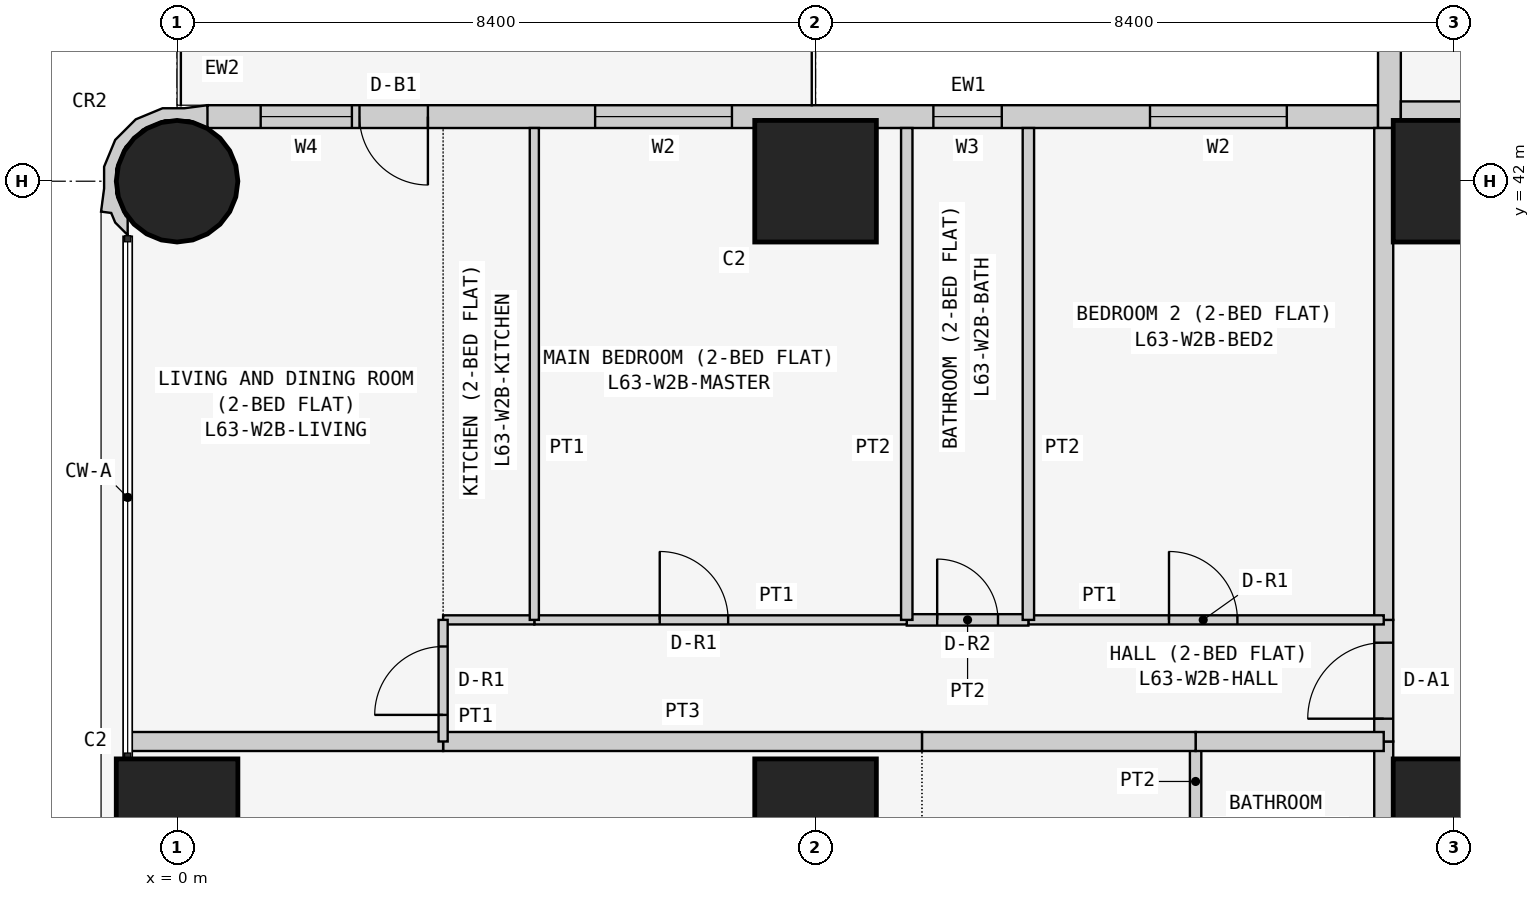
"""IFC4 building model, lengths in metres.
Left out: names, types, materials, properties, quantities, classifications, styles, units other than length and angle.
Written with IfcOpenShell. Run it as: python <this file> out.ifc"""

import sys

from ifc_helpers import new_model, si_unit, direction, frame, frame_2d, origin, origin_2d, place, context, subcontext, project, spatial, polyline, rectangle, circle, outline, extrude, element, fill, save


model = new_model("IFC4")
c1 = context("Model", 3, precision=1e-05, world=origin(), true_north=direction((0.0, 1.0)))
c2 = subcontext(c1, "Body", "Model", "MODEL_VIEW")
j1 = project(units=[si_unit("LENGTHUNIT", "METRE"), si_unit("PLANEANGLEUNIT", "RADIAN")], contexts=[c1])
p1 = place(None, origin())
s1 = spatial("IfcSite", under=j1, at=p1, CompositionType="ELEMENT")
p2 = place(p1, origin())
s2 = spatial("IfcBuilding", under=s1, at=p2, CompositionType="ELEMENT")
p3 = place(p2, frame((0.0, 0.0, 240.9)))
s3 = spatial("IfcBuildingStorey", under=s2, at=p3, CompositionType="ELEMENT", Elevation=240.9)
p4 = place(p3, frame((0.0, 33.6, 0.0), z_axis=(0.0, 0.0, 1.0), x_axis=(1.0, 0.0, 0.0)))
e1 = element("IfcColumn", 1, at=p4, inside=s3, PredefinedType="COLUMN", context=c2, shape_type="SweptSolid", body=[
    extrude(rectangle(XDim=1.6, YDim=1.6, at=origin_2d()), origin(), (0.0, 0.0, 1.0), 3.6),
])
p5 = place(p3, frame((0.0, 42.0, 0.0), z_axis=(0.0, 0.0, 1.0), x_axis=(1.0, 0.0, 0.0)))
e2 = element("IfcColumn", 2, at=p5, inside=s3, PredefinedType="COLUMN", context=c2, shape_type="SweptSolid", body=[
    extrude(circle(Radius=0.8, at=origin_2d()), origin(), (0.0, 0.0, 1.0), 3.6),
])
for number, where, z_axis, x_axis in (
    (3, (8.4, 33.6, 0.0), (0.0, 0.0, 1.0), (1.0, 0.0, 0.0)),
    (4, (8.4, 42.0, 0.0), (0.0, 0.0, 1.0), (1.0, 0.0, 0.0)),
    (5, (16.8, 33.6, 0.0), (0.0, 0.0, 1.0), (1.0, 0.0, 0.0)),
    (6, (16.8, 42.0, 0.0), (0.0, 0.0, 1.0), (1.0, 0.0, 0.0)),
):
    element("IfcColumn", number, at=place(p3, frame(where, z_axis=z_axis, x_axis=x_axis)), inside=s3, PredefinedType="COLUMN", context=c2, shape_type="SweptSolid", body=[
        extrude(rectangle(XDim=1.6, YDim=1.6, at=origin_2d()), origin(), (0.0, 0.0, 1.0), 3.6),
    ])
p6 = place(p3, frame((15.8, 42.85, 0.0), z_axis=(0.0, 0.0, 1.0), x_axis=(-1.0, 0.0, 0.0)))
e7 = element("IfcWall", 7, at=p6, inside=s3, PredefinedType="SOLIDWALL", context=c2, shape_type="SweptSolid", body=[
    extrude(rectangle(XDim=15.4, YDim=0.3, at=frame_2d((7.7, 0.0))), origin(), (0.0, 0.0, 1.0), 3.45),
])
p7 = place(p6, frame((1.2, 0.0, 0.9)))
e8 = element("IfcOpeningElement", 8, at=p7, cuts=e7, PredefinedType="OPENING", context=c2, shape_type="SweptSolid", body=[
    extrude(rectangle(XDim=1.8, YDim=1.5, at=frame_2d((0.9, 0.75))), frame((0.0, 0.16, 0.0), z_axis=(0.0, -1.0, 0.0), x_axis=(1.0, 0.0, 0.0)), (0.0, 0.0, 1.0), 0.32),
])
p8 = place(p6, frame((4.95, 0.0, 1.5)))
e9 = element("IfcOpeningElement", 9, at=p8, cuts=e7, PredefinedType="OPENING", context=c2, shape_type="SweptSolid", body=[
    extrude(rectangle(XDim=0.9, YDim=0.7, at=frame_2d((0.45, 0.35))), frame((0.0, 0.16, 0.0), z_axis=(0.0, -1.0, 0.0), x_axis=(1.0, 0.0, 0.0)), (0.0, 0.0, 1.0), 0.32),
])
p9 = place(p6, frame((8.5, 0.0, 0.9)))
e10 = element("IfcOpeningElement", 10, at=p9, cuts=e7, PredefinedType="OPENING", context=c2, shape_type="SweptSolid", body=[
    extrude(rectangle(XDim=1.8, YDim=1.5, at=frame_2d((0.9, 0.75))), frame((0.0, 0.16, 0.0), z_axis=(0.0, -1.0, 0.0), x_axis=(1.0, 0.0, 0.0)), (0.0, 0.0, 1.0), 0.32),
])
p10 = place(p6, frame((12.5, 0.0, 0.0)))
e11 = element("IfcOpeningElement", 11, at=p10, cuts=e7, PredefinedType="OPENING", context=c2, shape_type="SweptSolid", body=[
    extrude(rectangle(XDim=0.9, YDim=2.4, at=frame_2d((0.45, 1.2))), frame((0.0, 0.16, 0.0), z_axis=(0.0, -1.0, 0.0), x_axis=(1.0, 0.0, 0.0)), (0.0, 0.0, 1.0), 0.32),
])
p11 = place(p6, frame((13.5, 0.0, 0.9)))
e12 = element("IfcOpeningElement", 12, at=p11, cuts=e7, PredefinedType="OPENING", context=c2, shape_type="SweptSolid", body=[
    extrude(rectangle(XDim=1.2, YDim=1.5, at=frame_2d((0.6, 0.75))), frame((0.0, 0.16, 0.0), z_axis=(0.0, -1.0, 0.0), x_axis=(1.0, 0.0, 0.0)), (0.0, 0.0, 1.0), 0.32),
])
p12 = place(p3, frame((15.95, 50.0, 0.0), z_axis=(0.0, 0.0, 1.0), x_axis=(0.0, -1.0, 0.0)))
e13 = element("IfcWall", 13, at=p12, inside=s3, PredefinedType="SOLIDWALL", context=c2, shape_type="SweptSolid", body=[
    extrude(rectangle(XDim=7.3, YDim=0.3, at=frame_2d((3.65, 0.0))), origin(), (0.0, 0.0, 1.0), 3.45),
])
p13 = place(p12, frame((3.1, 0.0, 0.9)))
e14 = element("IfcOpeningElement", 14, at=p13, cuts=e13, PredefinedType="OPENING", context=c2, shape_type="SweptSolid", body=[
    extrude(rectangle(XDim=2.4, YDim=1.5, at=frame_2d((1.2, 0.75))), frame((0.0, 0.16, 0.0), z_axis=(0.0, -1.0, 0.0), x_axis=(1.0, 0.0, 0.0)), (0.0, 0.0, 1.0), 0.32),
])
p14 = place(p12, frame((0.75, 0.0, 0.9)))
e15 = element("IfcOpeningElement", 15, at=p14, cuts=e13, PredefinedType="OPENING", context=c2, shape_type="SweptSolid", body=[
    extrude(rectangle(XDim=1.2, YDim=1.5, at=frame_2d((0.6, 0.75))), frame((0.0, 0.16, 0.0), z_axis=(0.0, -1.0, 0.0), x_axis=(1.0, 0.0, 0.0)), (0.0, 0.0, 1.0), 0.32),
])
p15 = place(p3, frame((0.327, 42.817, 0.0), z_axis=(0.0, 0.0, 1.0), x_axis=(-0.93923434088, 0.343276641956, 0.0)))
e16 = element("IfcWall", 16, at=p15, inside=s3, PredefinedType="SOLIDWALL", context=c2, shape_type="SweptSolid", body=[
    extrude(outline(polyline([(-0.006, -0.197), (0.266, -0.055), (0.535, 0.044), (0.816, 0.302), (0.977, 0.648), (0.994, 1.03), (0.895, 1.299), (0.828, 1.598), (0.697, 1.569), (0.604, 1.67), (0.394, 1.767), (0.471, 1.556), (0.509, 1.539), (0.724, 1.304), (0.833, 1.005), (0.82, 0.687), (0.686, 0.397), (0.451, 0.182), (0.152, 0.073), (-0.116, 0.084), (-0.127, 0.078), (-0.146, 0.071), (-0.006, -0.197)])), origin(), (0.0, 0.0, 1.0), 3.45),
])
p16 = place(p3, frame((16.1, 42.925, 0.0), z_axis=(0.0, 0.0, 1.0), x_axis=(1.0, 0.0, 0.0)))
e17 = element("IfcWall", 17, at=p16, inside=s3, PredefinedType="PARTITIONING", context=c2, shape_type="SweptSolid", body=[
    extrude(rectangle(XDim=6.871, YDim=0.25, at=frame_2d((3.436, 0.0))), origin(), (0.0, 0.0, 1.0), 3.45),
])
p17 = place(p3, frame((15.875, 32.0, 0.0), z_axis=(0.0, 0.0, 1.0), x_axis=(0.0, 1.0, 0.0)))
e18 = element("IfcWall", 18, at=p17, inside=s3, PredefinedType="PARTITIONING", context=c2, shape_type="SweptSolid", body=[
    extrude(rectangle(XDim=2.629, YDim=0.25, at=frame_2d((1.314, 0.0))), origin(), (0.0, 0.0, 1.0), 3.45),
])
p18 = place(p3, frame((15.875, 34.629, 0.0), z_axis=(0.0, 0.0, 1.0), x_axis=(0.0, 1.0, 0.0)))
e19 = element("IfcWall", 19, at=p18, inside=s3, PredefinedType="PARTITIONING", context=c2, shape_type="SweptSolid", body=[
    extrude(rectangle(XDim=1.6, YDim=0.25, at=frame_2d((0.8, 0.0))), origin(), (0.0, 0.0, 1.0), 3.45),
])
p19 = place(p18, frame((0.3, 0.0, 0.0)))
e20 = element("IfcOpeningElement", 20, at=p19, cuts=e19, PredefinedType="OPENING", context=c2, shape_type="SweptSolid", body=[
    extrude(rectangle(XDim=1.0, YDim=2.1, at=frame_2d((0.5, 1.05))), frame((0.0, 0.135, 0.0), z_axis=(0.0, -1.0, 0.0), x_axis=(1.0, 0.0, 0.0)), (0.0, 0.0, 1.0), 0.27),
])
p20 = place(p3, frame((15.875, 36.229, 0.0), z_axis=(0.0, 0.0, 1.0), x_axis=(0.0, 1.0, 0.0)))
e21 = element("IfcWall", 21, at=p20, inside=s3, PredefinedType="PARTITIONING", context=c2, shape_type="SweptSolid", body=[
    extrude(rectangle(XDim=6.471, YDim=0.25, at=frame_2d((3.235, 0.0))), origin(), (0.0, 0.0, 1.0), 3.45),
])
p21 = place(p3, frame((13.4, 32.0, 0.0), z_axis=(0.0, 0.0, 1.0), x_axis=(0.0, 1.0, 0.0)))
e22 = element("IfcWall", 22, at=p21, inside=s3, PredefinedType="PARTITIONING", context=c2, shape_type="SweptSolid", body=[
    extrude(rectangle(XDim=2.629, YDim=0.15, at=frame_2d((1.314, 0.0))), origin(), (0.0, 0.0, 1.0), 3.45),
])
p22 = place(p3, frame((13.4, 34.629, 0.0), z_axis=(0.0, 0.0, 1.0), x_axis=(1.0, 0.0, 0.0)))
e23 = element("IfcWall", 23, at=p22, inside=s3, PredefinedType="PARTITIONING", context=c2, shape_type="SweptSolid", body=[
    extrude(rectangle(XDim=2.475, YDim=0.25, at=frame_2d((1.238, 0.0))), origin(), (0.0, 0.0, 1.0), 3.45),
])
p23 = place(p3, frame((9.8, 34.629, 0.0), z_axis=(0.0, 0.0, 1.0), x_axis=(1.0, 0.0, 0.0)))
e24 = element("IfcWall", 24, at=p23, inside=s3, PredefinedType="PARTITIONING", context=c2, shape_type="SweptSolid", body=[
    extrude(rectangle(XDim=3.6, YDim=0.25, at=frame_2d((1.8, 0.0))), origin(), (0.0, 0.0, 1.0), 3.45),
])
p24 = place(p3, frame((3.5, 34.629, 0.0), z_axis=(0.0, 0.0, 1.0), x_axis=(1.0, 0.0, 0.0)))
e25 = element("IfcWall", 25, at=p24, inside=s3, PredefinedType="PARTITIONING", context=c2, shape_type="SweptSolid", body=[
    extrude(rectangle(XDim=6.3, YDim=0.25, at=frame_2d((3.15, 0.0))), origin(), (0.0, 0.0, 1.0), 3.45),
])
p25 = place(p3, frame((-0.65, 34.629, 0.0), z_axis=(0.0, 0.0, 1.0), x_axis=(1.0, 0.0, 0.0)))
e26 = element("IfcWall", 26, at=p25, inside=s3, PredefinedType="PARTITIONING", context=c2, shape_type="SweptSolid", body=[
    extrude(rectangle(XDim=4.15, YDim=0.25, at=frame_2d((2.075, 0.0))), origin(), (0.0, 0.0, 1.0), 3.45),
])
p26 = place(p3, frame((11.2, 36.229, 0.0), z_axis=(0.0, 0.0, 1.0), x_axis=(1.0, 0.0, 0.0)))
e27 = element("IfcWall", 27, at=p26, inside=s3, PredefinedType="PARTITIONING", context=c2, shape_type="SweptSolid", body=[
    extrude(rectangle(XDim=4.675, YDim=0.12, at=frame_2d((2.337, 0.0))), origin(), (0.0, 0.0, 1.0), 3.45),
])
p27 = place(p26, frame((1.85, 0.0, 0.0)))
e28 = element("IfcOpeningElement", 28, at=p27, cuts=e27, PredefinedType="OPENING", context=c2, shape_type="SweptSolid", body=[
    extrude(rectangle(XDim=0.9, YDim=2.1, at=frame_2d((0.45, 1.05))), frame((0.0, 0.07, 0.0), z_axis=(0.0, -1.0, 0.0), x_axis=(1.0, 0.0, 0.0)), (0.0, 0.0, 1.0), 0.14),
])
p28 = place(p3, frame((9.6, 36.229, 0.0), z_axis=(0.0, 0.0, 1.0), x_axis=(1.0, 0.0, 0.0)))
e29 = element("IfcWall", 29, at=p28, inside=s3, PredefinedType="PARTITIONING", context=c2, shape_type="SweptSolid", body=[
    extrude(rectangle(XDim=1.6, YDim=0.15, at=frame_2d((0.8, 0.0))), origin(), (0.0, 0.0, 1.0), 3.45),
])
p29 = place(p28, frame((0.4, 0.0, 0.0)))
e30 = element("IfcOpeningElement", 30, at=p29, cuts=e29, PredefinedType="OPENING", context=c2, shape_type="SweptSolid", body=[
    extrude(rectangle(XDim=0.8, YDim=2.1, at=frame_2d((0.4, 1.05))), frame((0.0, 0.085, 0.0), z_axis=(0.0, -1.0, 0.0), x_axis=(1.0, 0.0, 0.0)), (0.0, 0.0, 1.0), 0.17),
])
p30 = place(p3, frame((4.7, 36.229, 0.0), z_axis=(0.0, 0.0, 1.0), x_axis=(1.0, 0.0, 0.0)))
e31 = element("IfcWall", 31, at=p30, inside=s3, PredefinedType="PARTITIONING", context=c2, shape_type="SweptSolid", body=[
    extrude(rectangle(XDim=4.9, YDim=0.12, at=frame_2d((2.45, 0.0))), origin(), (0.0, 0.0, 1.0), 3.45),
])
p31 = place(p30, frame((1.65, 0.0, 0.0)))
e32 = element("IfcOpeningElement", 32, at=p31, cuts=e31, PredefinedType="OPENING", context=c2, shape_type="SweptSolid", body=[
    extrude(rectangle(XDim=0.9, YDim=2.1, at=frame_2d((0.45, 1.05))), frame((0.0, 0.07, 0.0), z_axis=(0.0, -1.0, 0.0), x_axis=(1.0, 0.0, 0.0)), (0.0, 0.0, 1.0), 0.14),
])
p32 = place(p3, frame((3.5, 36.229, 0.0), z_axis=(0.0, 0.0, 1.0), x_axis=(1.0, 0.0, 0.0)))
e33 = element("IfcWall", 33, at=p32, inside=s3, PredefinedType="PARTITIONING", context=c2, shape_type="SweptSolid", body=[
    extrude(rectangle(XDim=1.2, YDim=0.12, at=frame_2d((0.6, 0.0))), origin(), (0.0, 0.0, 1.0), 3.45),
])
p33 = place(p3, frame((3.5, 34.629, 0.0), z_axis=(0.0, 0.0, 1.0), x_axis=(0.0, 1.0, 0.0)))
e34 = element("IfcWall", 34, at=p33, inside=s3, PredefinedType="PARTITIONING", context=c2, shape_type="SweptSolid", body=[
    extrude(rectangle(XDim=1.6, YDim=0.12, at=frame_2d((0.8, 0.0))), origin(), (0.0, 0.0, 1.0), 3.45),
])
p34 = place(p33, frame((0.35, 0.0, 0.0)))
e35 = element("IfcOpeningElement", 35, at=p34, cuts=e34, PredefinedType="OPENING", context=c2, shape_type="SweptSolid", body=[
    extrude(rectangle(XDim=0.9, YDim=2.1, at=frame_2d((0.45, 1.05))), frame((0.0, 0.07, 0.0), z_axis=(0.0, -1.0, 0.0), x_axis=(1.0, 0.0, 0.0)), (0.0, 0.0, 1.0), 0.14),
])
for number, where, z_axis, x_axis in (
    (36, (11.2, 36.229, 0.0), (0.0, 0.0, 1.0), (0.0, 1.0, 0.0)),
    (37, (9.6, 36.229, 0.0), (0.0, 0.0, 1.0), (0.0, 1.0, 0.0)),
):
    element("IfcWall", number, at=place(p3, frame(where, z_axis=z_axis, x_axis=x_axis)), inside=s3, PredefinedType="PARTITIONING", context=c2, shape_type="SweptSolid", body=[
        extrude(rectangle(XDim=6.471, YDim=0.15, at=frame_2d((3.235, 0.0))), origin(), (0.0, 0.0, 1.0), 3.45),
    ])
p35 = place(p3, frame((4.7, 36.229, 0.0), z_axis=(0.0, 0.0, 1.0), x_axis=(0.0, 1.0, 0.0)))
e38 = element("IfcWall", 38, at=p35, inside=s3, PredefinedType="PARTITIONING", context=c2, shape_type="SweptSolid", body=[
    extrude(rectangle(XDim=6.471, YDim=0.12, at=frame_2d((3.235, 0.0))), origin(), (0.0, 0.0, 1.0), 3.45),
])
p36 = place(p7, origin())
e39 = element("IfcWindow", 39, at=p36, inside=s3, PartitioningType="SINGLE_PANEL", PredefinedType="WINDOW", context=c2, shape_type="SweptSolid", body=[
    extrude(rectangle(XDim=1.8, YDim=1.5, at=frame_2d((0.9, 0.75))), frame((0.0, 0.03, 0.0), z_axis=(0.0, -1.0, 0.0), x_axis=(1.0, 0.0, 0.0)), (0.0, 0.0, 1.0), 0.06),
])
fill(e8, e39)
p37 = place(p8, origin())
e40 = element("IfcWindow", 40, at=p37, inside=s3, PartitioningType="SINGLE_PANEL", PredefinedType="WINDOW", context=c2, shape_type="SweptSolid", body=[
    extrude(rectangle(XDim=0.9, YDim=0.7, at=frame_2d((0.45, 0.35))), frame((0.0, 0.03, 0.0), z_axis=(0.0, -1.0, 0.0), x_axis=(1.0, 0.0, 0.0)), (0.0, 0.0, 1.0), 0.06),
])
fill(e9, e40)
p38 = place(p9, origin())
e41 = element("IfcWindow", 41, at=p38, inside=s3, PartitioningType="SINGLE_PANEL", PredefinedType="WINDOW", context=c2, shape_type="SweptSolid", body=[
    extrude(rectangle(XDim=1.8, YDim=1.5, at=frame_2d((0.9, 0.75))), frame((0.0, 0.03, 0.0), z_axis=(0.0, -1.0, 0.0), x_axis=(1.0, 0.0, 0.0)), (0.0, 0.0, 1.0), 0.06),
])
fill(e10, e41)
p39 = place(p10, origin())
e42 = element("IfcDoor", 42, at=p39, inside=s3, OperationType="SINGLE_SWING_LEFT", PredefinedType="DOOR", context=c2, shape_type="SweptSolid", body=[
    extrude(rectangle(XDim=0.9, YDim=2.4, at=frame_2d((0.45, 1.2))), frame((0.0, 0.025, 0.0), z_axis=(0.0, -1.0, 0.0), x_axis=(1.0, 0.0, 0.0)), (0.0, 0.0, 1.0), 0.05),
])
fill(e11, e42)
p40 = place(p11, origin())
e43 = element("IfcWindow", 43, at=p40, inside=s3, PartitioningType="SINGLE_PANEL", PredefinedType="WINDOW", context=c2, shape_type="SweptSolid", body=[
    extrude(rectangle(XDim=1.2, YDim=1.5, at=frame_2d((0.6, 0.75))), frame((0.0, 0.03, 0.0), z_axis=(0.0, -1.0, 0.0), x_axis=(1.0, 0.0, 0.0)), (0.0, 0.0, 1.0), 0.06),
])
fill(e12, e43)
p41 = place(p19, origin())
e44 = element("IfcDoor", 44, at=p41, inside=s3, OperationType="SINGLE_SWING_LEFT", PredefinedType="DOOR", context=c2, shape_type="SweptSolid", body=[
    extrude(rectangle(XDim=1.0, YDim=2.1, at=frame_2d((0.5, 1.05))), frame((0.0, 0.025, 0.0), z_axis=(0.0, -1.0, 0.0), x_axis=(1.0, 0.0, 0.0)), (0.0, 0.0, 1.0), 0.05),
])
fill(e20, e44)
p42 = place(p27, origin())
e45 = element("IfcDoor", 45, at=p42, inside=s3, OperationType="SINGLE_SWING_LEFT", PredefinedType="DOOR", context=c2, shape_type="SweptSolid", body=[
    extrude(rectangle(XDim=0.9, YDim=2.1, at=frame_2d((0.45, 1.05))), frame((0.0, 0.025, 0.0), z_axis=(0.0, -1.0, 0.0), x_axis=(1.0, 0.0, 0.0)), (0.0, 0.0, 1.0), 0.05),
])
fill(e28, e45)
p43 = place(p29, origin())
e46 = element("IfcDoor", 46, at=p43, inside=s3, OperationType="SINGLE_SWING_LEFT", PredefinedType="DOOR", context=c2, shape_type="SweptSolid", body=[
    extrude(rectangle(XDim=0.8, YDim=2.1, at=frame_2d((0.4, 1.05))), frame((0.0, 0.025, 0.0), z_axis=(0.0, -1.0, 0.0), x_axis=(1.0, 0.0, 0.0)), (0.0, 0.0, 1.0), 0.05),
])
fill(e30, e46)
p44 = place(p31, origin())
e47 = element("IfcDoor", 47, at=p44, inside=s3, OperationType="SINGLE_SWING_LEFT", PredefinedType="DOOR", context=c2, shape_type="SweptSolid", body=[
    extrude(rectangle(XDim=0.9, YDim=2.1, at=frame_2d((0.45, 1.05))), frame((0.0, 0.025, 0.0), z_axis=(0.0, -1.0, 0.0), x_axis=(1.0, 0.0, 0.0)), (0.0, 0.0, 1.0), 0.05),
])
fill(e32, e47)
p45 = place(p34, origin())
e48 = element("IfcDoor", 48, at=p45, inside=s3, OperationType="SINGLE_SWING_LEFT", PredefinedType="DOOR", context=c2, shape_type="SweptSolid", body=[
    extrude(rectangle(XDim=0.9, YDim=2.1, at=frame_2d((0.45, 1.05))), frame((0.0, 0.025, 0.0), z_axis=(0.0, -1.0, 0.0), x_axis=(1.0, 0.0, 0.0)), (0.0, 0.0, 1.0), 0.05),
])
fill(e35, e48)
save(model, sys.argv[1])
